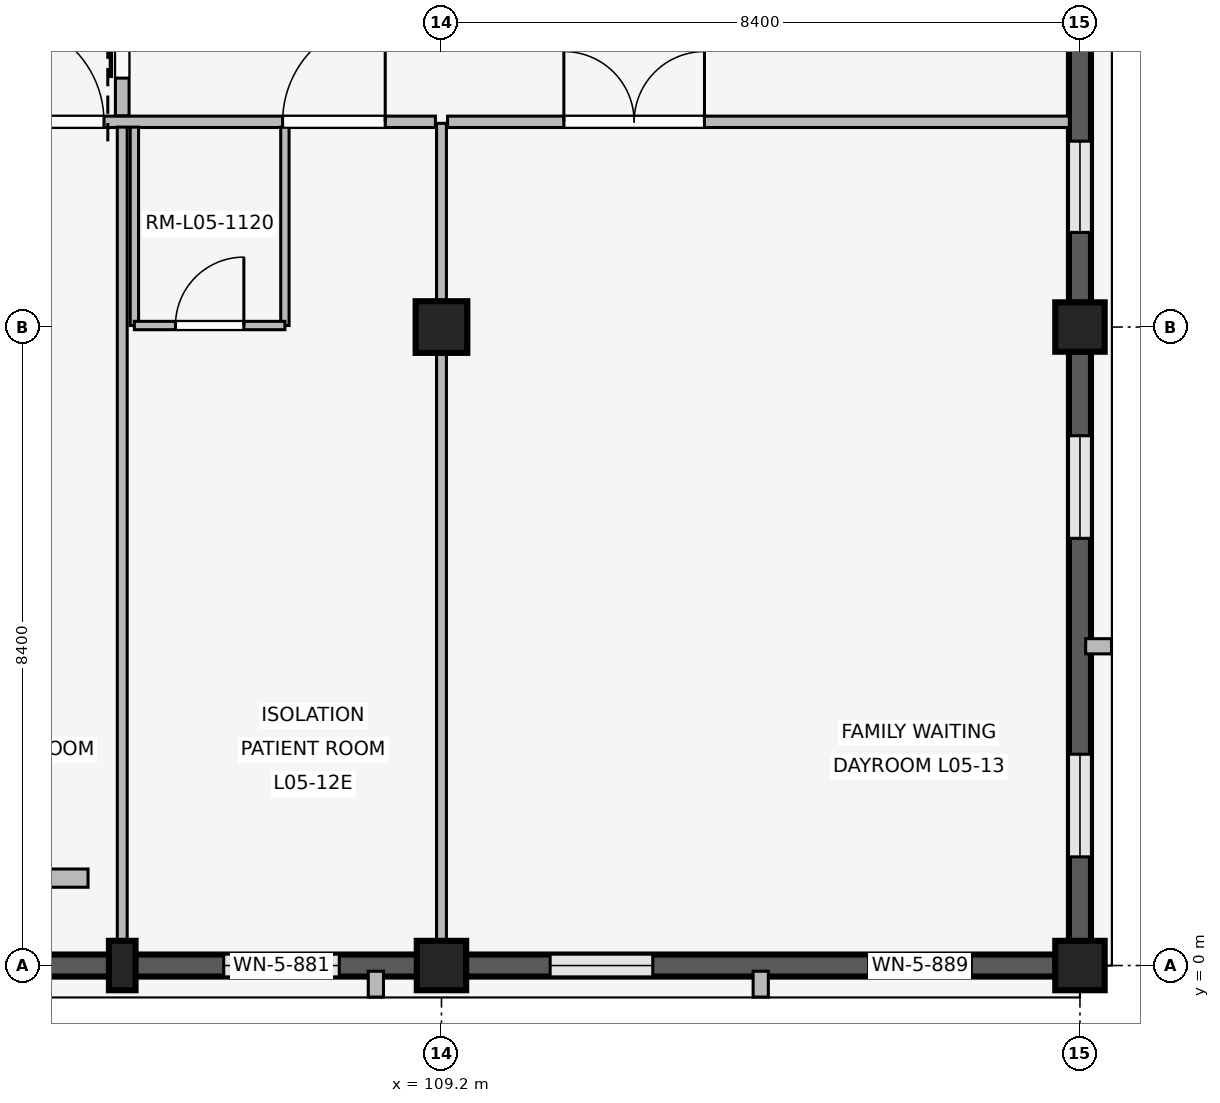
"""IFC4 building model, lengths in metres.
Left out: names, types, materials, properties, quantities, classifications, styles, units other than length and angle.
Written with IfcOpenShell. Run it as: python <this file> out.ifc"""

import sys

from ifc_helpers import new_model, si_unit, direction, frame, frame_2d, origin, origin_2d, place, context, subcontext, project, spatial, rectangle, extrude, element, fill, save


model = new_model("IFC4")
c1 = context("Model", 3, precision=1e-05, world=origin(), true_north=direction((0.0, 1.0)))
c2 = subcontext(c1, "Body", "Model", "MODEL_VIEW")
j1 = project(units=[si_unit("LENGTHUNIT", "METRE"), si_unit("PLANEANGLEUNIT", "RADIAN")], contexts=[c1])
p1 = place(None, origin())
s1 = spatial("IfcSite", under=j1, at=p1, CompositionType="ELEMENT")
p2 = place(p1, origin())
s2 = spatial("IfcBuilding", under=s1, at=p2, CompositionType="ELEMENT")
p3 = place(p2, frame((0.0, 0.0, 20.4)))
s3 = spatial("IfcBuildingStorey", under=s2, at=p3, CompositionType="ELEMENT", Elevation=20.4)
p4 = place(p3, frame((109.2, 0.0, 0.0), z_axis=(0.0, 0.0, 1.0), x_axis=(1.0, 0.0, 0.0)))
e1 = element("IfcColumn", 1, at=p4, inside=s3, PredefinedType="COLUMN", context=c2, shape_type="SweptSolid", body=[
    extrude(rectangle(XDim=0.65, YDim=0.65, at=origin_2d()), origin(), (0.0, 0.0, 1.0), 4.2),
])
p5 = place(p3, frame((109.2, 8.4, 0.0), z_axis=(0.0, 0.0, 1.0), x_axis=(1.0, 0.0, 0.0)))
e2 = element("IfcColumn", 2, at=p5, inside=s3, PredefinedType="COLUMN", context=c2, shape_type="SweptSolid", body=[
    extrude(rectangle(XDim=0.68, YDim=0.68, at=origin_2d()), origin(), (0.0, 0.0, 1.0), 4.2),
])
for number, where, z_axis, x_axis in (
    (3, (117.6, 0.0, 0.0), (0.0, 0.0, 1.0), (1.0, 0.0, 0.0)),
    (4, (117.6, 8.4, 0.0), (0.0, 0.0, 1.0), (1.0, 0.0, 0.0)),
):
    element("IfcColumn", number, at=place(p3, frame(where, z_axis=z_axis, x_axis=x_axis)), inside=s3, PredefinedType="COLUMN", context=c2, shape_type="SweptSolid", body=[
        extrude(rectangle(XDim=0.65, YDim=0.65, at=origin_2d()), origin(), (0.0, 0.0, 1.0), 4.2),
    ])
p6 = place(p3, frame((105.0, 0.0, 0.0), z_axis=(0.0, 0.0, 1.0), x_axis=(1.0, 0.0, 0.0)))
e5 = element("IfcColumn", 5, at=p6, inside=s3, PredefinedType="PILASTER", context=c2, shape_type="SweptSolid", body=[
    extrude(rectangle(XDim=0.35, YDim=0.65, at=origin_2d()), origin(), (0.0, 0.0, 1.0), 4.2),
])
p7 = place(p3, frame((108.88, 0.0, 0.0), z_axis=(0.0, 0.0, 1.0), x_axis=(-1.0, 0.0, 0.0)))
e6 = element("IfcWall", 6, at=p7, inside=s3, PredefinedType="SOLIDWALL", context=c2, shape_type="SweptSolid", body=[
    extrude(rectangle(XDim=7.76, YDim=0.29, at=frame_2d((3.88, 0.0))), origin(), (0.0, 0.0, 1.0), 3.34),
])
p8 = place(p7, frame((1.025, 0.0, 0.85)))
e7 = element("IfcOpeningElement", 7, at=p8, cuts=e6, PredefinedType="OPENING", context=c2, shape_type="SweptSolid", body=[
    extrude(rectangle(XDim=1.52, YDim=1.65, at=frame_2d((0.76, 0.825))), frame((0.0, 0.155, 0.0), z_axis=(0.0, -1.0, 0.0), x_axis=(1.0, 0.0, 0.0)), (0.0, 0.0, 1.0), 0.31),
])
p9 = place(p7, frame((5.215, 0.0, 0.85)))
e8 = element("IfcOpeningElement", 8, at=p9, cuts=e6, PredefinedType="OPENING", context=c2, shape_type="SweptSolid", body=[
    extrude(rectangle(XDim=1.52, YDim=1.65, at=frame_2d((0.76, 0.825))), frame((0.0, 0.155, 0.0), z_axis=(0.0, -1.0, 0.0), x_axis=(1.0, 0.0, 0.0)), (0.0, 0.0, 1.0), 0.31),
])
p10 = place(p3, frame((108.337, -0.075, 0.0), z_axis=(0.0, 0.0, 1.0), x_axis=(0.0, -1.0, 0.0)))
e9 = element("IfcWall", 9, at=p10, inside=s3, PredefinedType="ELEMENTEDWALL", context=c2, shape_type="SweptSolid", body=[
    extrude(rectangle(XDim=0.34, YDim=0.2, at=frame_2d((0.17, 0.0))), origin(), (0.0, 0.0, 1.0), 3.32),
])
p11 = place(p3, frame((117.28, 0.0, 0.0), z_axis=(0.0, 0.0, 1.0), x_axis=(-1.0, 0.0, 0.0)))
e10 = element("IfcWall", 10, at=p11, inside=s3, PredefinedType="SOLIDWALL", context=c2, shape_type="SweptSolid", body=[
    extrude(rectangle(XDim=7.76, YDim=0.29, at=frame_2d((3.88, 0.0))), origin(), (0.0, 0.0, 1.0), 3.34),
])
p12 = place(p11, frame((1.11, 0.0, 0.85)))
e11 = element("IfcOpeningElement", 11, at=p12, cuts=e10, PredefinedType="OPENING", context=c2, shape_type="SweptSolid", body=[
    extrude(rectangle(XDim=1.35, YDim=1.55, at=frame_2d((0.675, 0.775))), frame((0.0, 0.155, 0.0), z_axis=(0.0, -1.0, 0.0), x_axis=(1.0, 0.0, 0.0)), (0.0, 0.0, 1.0), 0.31),
])
p13 = place(p11, frame((5.3, 0.0, 0.85)))
e12 = element("IfcOpeningElement", 12, at=p13, cuts=e10, PredefinedType="OPENING", context=c2, shape_type="SweptSolid", body=[
    extrude(rectangle(XDim=1.35, YDim=1.55, at=frame_2d((0.675, 0.775))), frame((0.0, 0.155, 0.0), z_axis=(0.0, -1.0, 0.0), x_axis=(1.0, 0.0, 0.0)), (0.0, 0.0, 1.0), 0.31),
])
p14 = place(p3, frame((113.4, -0.075, 0.0), z_axis=(0.0, 0.0, 1.0), x_axis=(0.0, -1.0, 0.0)))
e13 = element("IfcWall", 13, at=p14, inside=s3, PredefinedType="ELEMENTEDWALL", context=c2, shape_type="SweptSolid", body=[
    extrude(rectangle(XDim=0.34, YDim=0.2, at=frame_2d((0.17, 0.0))), origin(), (0.0, 0.0, 1.0), 3.32),
])
p15 = place(p3, frame((117.6, 8.08, 0.0), z_axis=(0.0, 0.0, 1.0), x_axis=(0.0, -1.0, 0.0)))
e14 = element("IfcWall", 14, at=p15, inside=s3, PredefinedType="SOLIDWALL", context=c2, shape_type="SweptSolid", body=[
    extrude(rectangle(XDim=7.76, YDim=0.29, at=frame_2d((3.88, 0.0))), origin(), (0.0, 0.0, 1.0), 3.34),
])
p16 = place(p15, frame((1.11, 0.0, 0.85)))
e15 = element("IfcOpeningElement", 15, at=p16, cuts=e14, PredefinedType="OPENING", context=c2, shape_type="SweptSolid", body=[
    extrude(rectangle(XDim=1.35, YDim=1.55, at=frame_2d((0.675, 0.775))), frame((0.0, 0.155, 0.0), z_axis=(0.0, -1.0, 0.0), x_axis=(1.0, 0.0, 0.0)), (0.0, 0.0, 1.0), 0.31),
])
p17 = place(p15, frame((5.3, 0.0, 0.85)))
e16 = element("IfcOpeningElement", 16, at=p17, cuts=e14, PredefinedType="OPENING", context=c2, shape_type="SweptSolid", body=[
    extrude(rectangle(XDim=1.35, YDim=1.55, at=frame_2d((0.675, 0.775))), frame((0.0, 0.155, 0.0), z_axis=(0.0, -1.0, 0.0), x_axis=(1.0, 0.0, 0.0)), (0.0, 0.0, 1.0), 0.31),
])
p18 = place(p3, frame((117.675, 4.2, 0.0), z_axis=(0.0, 0.0, 1.0), x_axis=(1.0, 0.0, 0.0)))
e17 = element("IfcWall", 17, at=p18, inside=s3, PredefinedType="ELEMENTEDWALL", context=c2, shape_type="SweptSolid", body=[
    extrude(rectangle(XDim=0.34, YDim=0.2, at=frame_2d((0.17, 0.0))), origin(), (0.0, 0.0, 1.0), 3.32),
])
p19 = place(p3, frame((117.6, 16.48, 0.0), z_axis=(0.0, 0.0, 1.0), x_axis=(0.0, -1.0, 0.0)))
e18 = element("IfcWall", 18, at=p19, inside=s3, PredefinedType="SOLIDWALL", context=c2, shape_type="SweptSolid", body=[
    extrude(rectangle(XDim=7.76, YDim=0.29, at=frame_2d((3.88, 0.0))), origin(), (0.0, 0.0, 1.0), 3.34),
])
p20 = place(p19, frame((0.925, 0.0, 0.85)))
e19 = element("IfcOpeningElement", 19, at=p20, cuts=e18, PredefinedType="OPENING", context=c2, shape_type="SweptSolid", body=[
    extrude(rectangle(XDim=1.2, YDim=1.55, at=frame_2d((0.6, 0.775))), frame((0.0, 0.155, 0.0), z_axis=(0.0, -1.0, 0.0), x_axis=(1.0, 0.0, 0.0)), (0.0, 0.0, 1.0), 0.31),
])
p21 = place(p19, frame((5.635, 0.0, 0.85)))
e20 = element("IfcOpeningElement", 20, at=p21, cuts=e18, PredefinedType="OPENING", context=c2, shape_type="SweptSolid", body=[
    extrude(rectangle(XDim=1.2, YDim=1.55, at=frame_2d((0.6, 0.775))), frame((0.0, 0.155, 0.0), z_axis=(0.0, -1.0, 0.0), x_axis=(1.0, 0.0, 0.0)), (0.0, 0.0, 1.0), 0.31),
])
p22 = place(p3, frame((101.16, 11.1, 0.0), z_axis=(0.0, 0.0, 1.0), x_axis=(1.0, 0.0, 0.0)))
e21 = element("IfcWall", 21, at=p22, inside=s3, PredefinedType="PARTITIONING", context=c2, shape_type="SweptSolid", body=[
    extrude(rectangle(XDim=7.96, YDim=0.15, at=frame_2d((3.98, 0.0))), origin(), (0.0, 0.0, 1.0), 3.32),
])
p23 = place(p22, frame((2.25, 0.0, 0.0)))
e22 = element("IfcOpeningElement", 22, at=p23, cuts=e21, PredefinedType="OPENING", context=c2, shape_type="SweptSolid", body=[
    extrude(rectangle(XDim=1.35, YDim=2.25, at=frame_2d((0.675, 1.125))), frame((0.0, 0.085, 0.0), z_axis=(0.0, -1.0, 0.0), x_axis=(1.0, 0.0, 0.0)), (0.0, 0.0, 1.0), 0.17),
])
p24 = place(p22, frame((5.95, 0.0, 0.0)))
e23 = element("IfcOpeningElement", 23, at=p24, cuts=e21, PredefinedType="OPENING", context=c2, shape_type="SweptSolid", body=[
    extrude(rectangle(XDim=1.35, YDim=2.25, at=frame_2d((0.675, 1.125))), frame((0.0, 0.085, 0.0), z_axis=(0.0, -1.0, 0.0), x_axis=(1.0, 0.0, 0.0)), (0.0, 0.0, 1.0), 0.17),
])
p25 = place(p3, frame((105.0, 0.1, 0.0), z_axis=(0.0, 0.0, 1.0), x_axis=(0.0, 1.0, 0.0)))
e24 = element("IfcWall", 24, at=p25, inside=s3, PredefinedType="PARTITIONING", context=c2, shape_type="SweptSolid", body=[
    extrude(rectangle(XDim=10.93, YDim=0.13, at=frame_2d((5.465, 0.0))), origin(), (0.0, 0.0, 1.0), 3.32),
])
for number, where, z_axis, x_axis in (
    (25, (105.16, 8.42, 0.0), (0.0, 0.0, 1.0), (0.0, 1.0, 0.0)),
    (26, (107.14, 8.42, 0.0), (0.0, 0.0, 1.0), (0.0, 1.0, 0.0)),
):
    element("IfcWall", number, at=place(p3, frame(where, z_axis=z_axis, x_axis=x_axis)), inside=s3, PredefinedType="PARTITIONING", context=c2, shape_type="SweptSolid", body=[
        extrude(rectangle(XDim=2.61, YDim=0.11, at=frame_2d((1.305, 0.0))), origin(), (0.0, 0.0, 1.0), 3.32),
    ])
p26 = place(p3, frame((105.16, 8.42, 0.0), z_axis=(0.0, 0.0, 1.0), x_axis=(1.0, 0.0, 0.0)))
e27 = element("IfcWall", 27, at=p26, inside=s3, PredefinedType="PARTITIONING", context=c2, shape_type="SweptSolid", body=[
    extrude(rectangle(XDim=1.98, YDim=0.11, at=frame_2d((0.99, 0.0))), origin(), (0.0, 0.0, 1.0), 3.32),
])
p27 = place(p26, frame((0.54, 0.0, 0.0)))
e28 = element("IfcOpeningElement", 28, at=p27, cuts=e27, PredefinedType="OPENING", context=c2, shape_type="SweptSolid", body=[
    extrude(rectangle(XDim=0.9, YDim=2.1, at=frame_2d((0.45, 1.05))), frame((0.0, 0.065, 0.0), z_axis=(0.0, -1.0, 0.0), x_axis=(1.0, 0.0, 0.0)), (0.0, 0.0, 1.0), 0.13),
])
p28 = place(p3, frame((103.65, 1.15, 0.0), z_axis=(0.0, 0.0, 1.0), x_axis=(1.0, 0.0, 0.0)))
e29 = element("IfcWall", 29, at=p28, inside=s3, PredefinedType="PLUMBINGWALL", context=c2, shape_type="SweptSolid", body=[
    extrude(rectangle(XDim=0.9, YDim=0.24, at=frame_2d((0.45, 0.0))), origin(), (0.0, 0.0, 1.0), 3.32),
])
p29 = place(p3, frame((105.0, 11.18, 0.0), z_axis=(0.0, 0.0, 1.0), x_axis=(0.0, 1.0, 0.0)))
e30 = element("IfcWall", 30, at=p29, inside=s3, PredefinedType="PARTITIONING", context=c2, shape_type="SweptSolid", body=[
    extrude(rectangle(XDim=2.84, YDim=0.18, at=frame_2d((1.42, 0.0))), origin(), (0.0, 0.0, 1.0), 3.32),
])
p30 = place(p29, frame((0.495, 0.0, 0.0)))
e31 = element("IfcOpeningElement", 31, at=p30, cuts=e30, PredefinedType="OPENING", context=c2, shape_type="SweptSolid", body=[
    extrude(rectangle(XDim=1.85, YDim=2.3, at=frame_2d((0.925, 1.15))), frame((0.0, 0.1, 0.0), z_axis=(0.0, -1.0, 0.0), x_axis=(1.0, 0.0, 0.0)), (0.0, 0.0, 1.0), 0.2),
])
p31 = place(p3, frame((109.2, 0.14, 0.0), z_axis=(0.0, 0.0, 1.0), x_axis=(0.0, 1.0, 0.0)))
e32 = element("IfcWall", 32, at=p31, inside=s3, PredefinedType="PARTITIONING", context=c2, shape_type="SweptSolid", body=[
    extrude(rectangle(XDim=10.94, YDim=0.13, at=frame_2d((5.47, 0.0))), origin(), (0.0, 0.0, 1.0), 3.32),
])
p32 = place(p3, frame((109.28, 11.1, 0.0), z_axis=(0.0, 0.0, 1.0), x_axis=(1.0, 0.0, 0.0)))
e33 = element("IfcWall", 33, at=p32, inside=s3, PredefinedType="PARTITIONING", context=c2, shape_type="SweptSolid", body=[
    extrude(rectangle(XDim=8.18, YDim=0.15, at=frame_2d((4.09, 0.0))), origin(), (0.0, 0.0, 1.0), 3.32),
])
p33 = place(p32, frame((1.53, 0.0, 0.0)))
e34 = element("IfcOpeningElement", 34, at=p33, cuts=e33, PredefinedType="OPENING", context=c2, shape_type="SweptSolid", body=[
    extrude(rectangle(XDim=1.85, YDim=2.3, at=frame_2d((0.925, 1.15))), frame((0.0, 0.085, 0.0), z_axis=(0.0, -1.0, 0.0), x_axis=(1.0, 0.0, 0.0)), (0.0, 0.0, 1.0), 0.17),
])
p34 = place(p8, origin())
e35 = element("IfcWindow", 35, at=p34, inside=s3, PartitioningType="SINGLE_PANEL", PredefinedType="WINDOW", context=c2, shape_type="SweptSolid", body=[
    extrude(rectangle(XDim=1.52, YDim=1.65, at=frame_2d((0.76, 0.825))), frame((0.0, 0.03, 0.0), z_axis=(0.0, -1.0, 0.0), x_axis=(1.0, 0.0, 0.0)), (0.0, 0.0, 1.0), 0.06),
])
fill(e7, e35)
p35 = place(p12, origin())
e36 = element("IfcWindow", 36, at=p35, inside=s3, PartitioningType="SINGLE_PANEL", PredefinedType="WINDOW", context=c2, shape_type="SweptSolid", body=[
    extrude(rectangle(XDim=1.35, YDim=1.55, at=frame_2d((0.675, 0.775))), frame((0.0, 0.03, 0.0), z_axis=(0.0, -1.0, 0.0), x_axis=(1.0, 0.0, 0.0)), (0.0, 0.0, 1.0), 0.06),
])
fill(e11, e36)
p36 = place(p13, origin())
e37 = element("IfcWindow", 37, at=p36, inside=s3, PartitioningType="SINGLE_PANEL", PredefinedType="WINDOW", context=c2, shape_type="SweptSolid", body=[
    extrude(rectangle(XDim=1.35, YDim=1.55, at=frame_2d((0.675, 0.775))), frame((0.0, 0.03, 0.0), z_axis=(0.0, -1.0, 0.0), x_axis=(1.0, 0.0, 0.0)), (0.0, 0.0, 1.0), 0.06),
])
fill(e12, e37)
p37 = place(p16, origin())
e38 = element("IfcWindow", 38, at=p37, inside=s3, PartitioningType="SINGLE_PANEL", PredefinedType="WINDOW", context=c2, shape_type="SweptSolid", body=[
    extrude(rectangle(XDim=1.35, YDim=1.55, at=frame_2d((0.675, 0.775))), frame((0.0, 0.03, 0.0), z_axis=(0.0, -1.0, 0.0), x_axis=(1.0, 0.0, 0.0)), (0.0, 0.0, 1.0), 0.06),
])
fill(e15, e38)
p38 = place(p17, origin())
e39 = element("IfcWindow", 39, at=p38, inside=s3, PartitioningType="SINGLE_PANEL", PredefinedType="WINDOW", context=c2, shape_type="SweptSolid", body=[
    extrude(rectangle(XDim=1.35, YDim=1.55, at=frame_2d((0.675, 0.775))), frame((0.0, 0.03, 0.0), z_axis=(0.0, -1.0, 0.0), x_axis=(1.0, 0.0, 0.0)), (0.0, 0.0, 1.0), 0.06),
])
fill(e16, e39)
p39 = place(p21, origin())
e40 = element("IfcWindow", 40, at=p39, inside=s3, PartitioningType="SINGLE_PANEL", PredefinedType="WINDOW", context=c2, shape_type="SweptSolid", body=[
    extrude(rectangle(XDim=1.2, YDim=1.55, at=frame_2d((0.6, 0.775))), frame((0.0, 0.03, 0.0), z_axis=(0.0, -1.0, 0.0), x_axis=(1.0, 0.0, 0.0)), (0.0, 0.0, 1.0), 0.06),
])
fill(e20, e40)
p40 = place(p23, origin())
e41 = element("IfcDoor", 41, at=p40, inside=s3, OperationType="SINGLE_SWING_LEFT", PredefinedType="DOOR", context=c2, shape_type="SweptSolid", body=[
    extrude(rectangle(XDim=1.35, YDim=2.25, at=frame_2d((0.675, 1.125))), frame((0.0, 0.025, 0.0), z_axis=(0.0, -1.0, 0.0), x_axis=(1.0, 0.0, 0.0)), (0.0, 0.0, 1.0), 0.05),
])
fill(e22, e41)
p41 = place(p24, origin())
e42 = element("IfcDoor", 42, at=p41, inside=s3, OperationType="SINGLE_SWING_RIGHT", PredefinedType="DOOR", context=c2, shape_type="SweptSolid", body=[
    extrude(rectangle(XDim=1.35, YDim=2.25, at=frame_2d((0.675, 1.125))), frame((0.0, 0.025, 0.0), z_axis=(0.0, -1.0, 0.0), x_axis=(1.0, 0.0, 0.0)), (0.0, 0.0, 1.0), 0.05),
])
fill(e23, e42)
p42 = place(p27, origin())
e43 = element("IfcDoor", 43, at=p42, inside=s3, OperationType="SINGLE_SWING_RIGHT", PredefinedType="DOOR", context=c2, shape_type="SweptSolid", body=[
    extrude(rectangle(XDim=0.9, YDim=2.1, at=frame_2d((0.45, 1.05))), frame((0.0, 0.025, 0.0), z_axis=(0.0, -1.0, 0.0), x_axis=(1.0, 0.0, 0.0)), (0.0, 0.0, 1.0), 0.05),
])
fill(e28, e43)
p43 = place(p30, origin())
e44 = element("IfcDoor", 44, at=p43, inside=s3, OperationType="SLIDING_TO_LEFT", PredefinedType="DOOR", context=c2, shape_type="SweptSolid", body=[
    extrude(rectangle(XDim=1.85, YDim=2.3, at=frame_2d((0.925, 1.15))), frame((0.0, 0.025, 0.0), z_axis=(0.0, -1.0, 0.0), x_axis=(1.0, 0.0, 0.0)), (0.0, 0.0, 1.0), 0.05),
])
fill(e31, e44)
p44 = place(p33, origin())
e45 = element("IfcDoor", 45, at=p44, inside=s3, OperationType="DOUBLE_SWING_LEFT", PredefinedType="DOOR", context=c2, shape_type="SweptSolid", body=[
    extrude(rectangle(XDim=1.85, YDim=2.3, at=frame_2d((0.925, 1.15))), frame((0.0, 0.025, 0.0), z_axis=(0.0, -1.0, 0.0), x_axis=(1.0, 0.0, 0.0)), (0.0, 0.0, 1.0), 0.05),
])
fill(e34, e45)
save(model, sys.argv[1])
